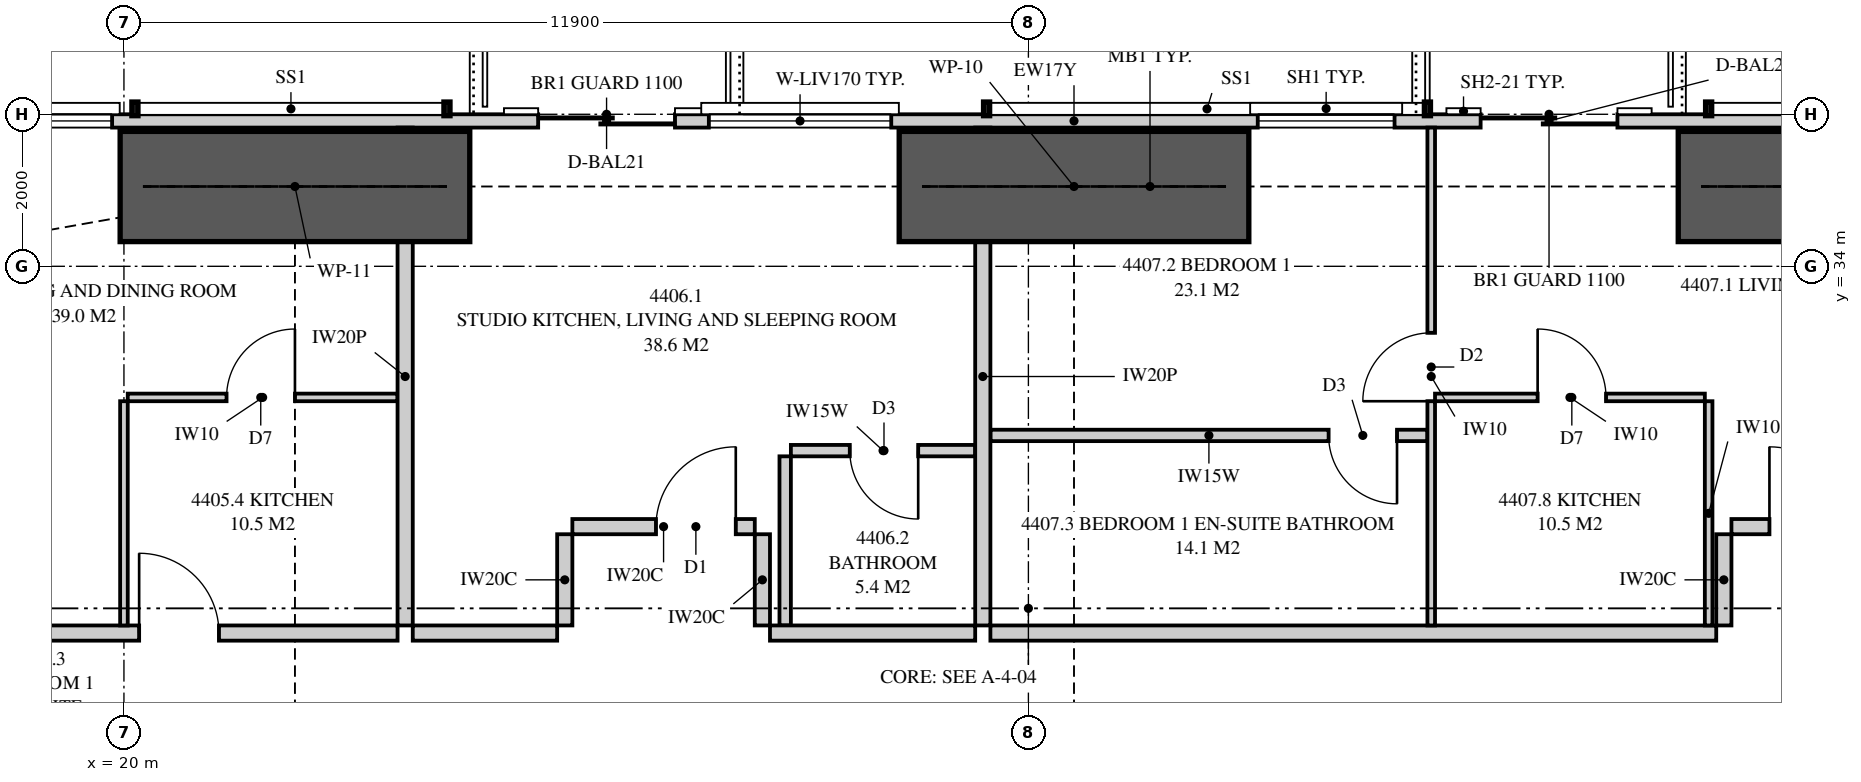
"""IFC4 building model, lengths in metres.
Left out: names, types, materials, properties, quantities, classifications, styles, units other than length and angle.
Written with IfcOpenShell. Run it as: python <this file> out.ifc"""

import sys

from ifc_helpers import new_model, si_unit, direction, frame, frame_2d, origin, place, context, subcontext, project, spatial, polyline, rectangle, outline, extrude, element, fill, save


model = new_model("IFC4")
c1 = context("Model", 3, precision=1e-05, world=origin(), true_north=direction((0.0, 1.0)))
c2 = subcontext(c1, "Body", "Model", "MODEL_VIEW")
j1 = project(units=[si_unit("LENGTHUNIT", "METRE"), si_unit("PLANEANGLEUNIT", "RADIAN")], contexts=[c1])
p1 = place(None, origin())
s1 = spatial("IfcSite", under=j1, at=p1, CompositionType="ELEMENT")
p2 = place(p1, origin())
s2 = spatial("IfcBuilding", under=s1, at=p2, CompositionType="ELEMENT")
p3 = place(p2, frame((0.0, 0.0, 164.4)))
s3 = spatial("IfcBuildingStorey", under=s2, at=p3, CompositionType="ELEMENT", Elevation=164.4)
p4 = place(p3, frame((49.949, 35.913, 0.0), z_axis=(0.0, 0.0, 1.0), x_axis=(-1.0, 0.0, 0.0)))
e1 = element("IfcWall", 1, at=p4, inside=s3, PredefinedType="SOLIDWALL", context=c2, shape_type="SweptSolid", body=[
    extrude(outline(polyline([(0.0, 0.0), (34.897, 0.0), (34.897, 3.11), (27.91, 3.11), (27.91, 2.15), (27.836, 2.15), (27.836, 3.11), (27.699, 3.11), (27.699, 2.15), (7.199, 2.15), (7.199, 3.11), (7.062, 3.11), (7.062, 2.15), (6.987, 2.15), (6.987, 3.11), (0.0, 3.11), (0.0, 0.0)])), frame((0.0, 0.087, 0.0), z_axis=(0.0, -1.0, 0.0), x_axis=(1.0, 0.0, 0.0)), (0.0, 0.0, 1.0), 0.175),
])
p5 = place(p4, frame((2.149, 0.0, 0.4)))
e2 = element("IfcOpeningElement", 2, at=p5, cuts=e1, PredefinedType="OPENING", context=c2, shape_type="SweptSolid", body=[
    extrude(rectangle(XDim=1.8, YDim=1.7, at=frame_2d((0.9, 0.85))), frame((0.0, 0.097, 0.0), z_axis=(0.0, -1.0, 0.0), x_axis=(1.0, 0.0, 0.0)), (0.0, 0.0, 1.0), 0.195),
])
p6 = place(p4, frame((10.299, 0.0, 0.0)))
e3 = element("IfcOpeningElement", 3, at=p6, cuts=e1, PredefinedType="OPENING", context=c2, shape_type="SweptSolid", body=[
    extrude(rectangle(XDim=1.8, YDim=2.1, at=frame_2d((0.9, 1.05))), frame((0.0, 0.097, 0.0), z_axis=(0.0, -1.0, 0.0), x_axis=(1.0, 0.0, 0.0)), (0.0, 0.0, 1.0), 0.195),
])
p7 = place(p4, frame((13.231, 0.0, 0.4)))
e4 = element("IfcOpeningElement", 4, at=p7, cuts=e1, PredefinedType="OPENING", context=c2, shape_type="SweptSolid", body=[
    extrude(rectangle(XDim=1.8, YDim=1.7, at=frame_2d((0.9, 0.85))), frame((0.0, 0.097, 0.0), z_axis=(0.0, -1.0, 0.0), x_axis=(1.0, 0.0, 0.0)), (0.0, 0.0, 1.0), 0.195),
])
p8 = place(p4, frame((22.699, 0.0, 0.0)))
e5 = element("IfcOpeningElement", 5, at=p8, cuts=e1, PredefinedType="OPENING", context=c2, shape_type="SweptSolid", body=[
    extrude(rectangle(XDim=1.8, YDim=2.1, at=frame_2d((0.9, 1.05))), frame((0.0, 0.097, 0.0), z_axis=(0.0, -1.0, 0.0), x_axis=(1.0, 0.0, 0.0)), (0.0, 0.0, 1.0), 0.195),
])
p9 = place(p4, frame((19.853, 0.0, 0.4)))
e6 = element("IfcOpeningElement", 6, at=p9, cuts=e1, PredefinedType="OPENING", context=c2, shape_type="SweptSolid", body=[
    extrude(rectangle(XDim=2.4, YDim=1.7, at=frame_2d((1.2, 0.85))), frame((0.0, 0.097, 0.0), z_axis=(0.0, -1.0, 0.0), x_axis=(1.0, 0.0, 0.0)), (0.0, 0.0, 1.0), 0.195),
])
p10 = place(p4, frame((30.104, 0.0, 0.4)))
e7 = element("IfcOpeningElement", 7, at=p10, cuts=e1, PredefinedType="OPENING", context=c2, shape_type="SweptSolid", body=[
    extrude(rectangle(XDim=2.4, YDim=1.7, at=frame_2d((1.2, 0.85))), frame((0.0, 0.097, 0.0), z_axis=(0.0, -1.0, 0.0), x_axis=(1.0, 0.0, 0.0)), (0.0, 0.0, 1.0), 0.195),
])
p11 = place(p3, frame((23.7, 35.825, 0.0), z_axis=(0.0, 0.0, 1.0), x_axis=(0.0, -1.0, 0.0)))
e8 = element("IfcWall", 8, at=p11, inside=s3, PredefinedType="PARTITIONING", context=c2, shape_type="SweptSolid", body=[
    extrude(outline(polyline([(0.529, 2.15), (0.0, 2.15), (0.0, 0.0), (0.529, 0.0), (0.529, 0.332), (1.021, 0.332), (1.021, 0.0), (6.55, 0.0), (6.55, 3.11), (1.685, 3.11), (1.685, 2.15), (1.021, 2.15), (1.021, 1.818), (0.529, 1.818), (0.529, 2.15)])), frame((0.0, 0.1, 0.0), z_axis=(0.0, -1.0, 0.0), x_axis=(1.0, 0.0, 0.0)), (0.0, 0.0, 1.0), 0.2),
])
p12 = place(p3, frame((17.85, 29.175, 0.0), z_axis=(0.0, 0.0, 1.0), x_axis=(1.0, 0.0, 0.0)))
e9 = element("IfcWall", 9, at=p12, inside=s3, PredefinedType="PARTITIONING", context=c2, shape_type="SweptSolid", body=[
    extrude(outline(polyline([(0.0, 0.0), (5.75, 0.0), (5.75, 3.11), (4.737, 3.11), (4.737, 2.541), (4.062, 2.541), (4.062, 3.11), (0.0, 3.11), (0.0, 0.0)])), frame((0.0, 0.1, 0.0), z_axis=(0.0, -1.0, 0.0), x_axis=(1.0, 0.0, 0.0)), (0.0, 0.0, 1.0), 0.2),
])
p13 = place(p12, frame((2.35, 0.0, 0.0)))
e10 = element("IfcOpeningElement", 10, at=p13, cuts=e9, PredefinedType="OPENING", context=c2, shape_type="SweptSolid", body=[
    extrude(rectangle(XDim=1.05, YDim=2.2, at=frame_2d((0.525, 1.1))), frame((0.0, 0.11, 0.0), z_axis=(0.0, -1.0, 0.0), x_axis=(1.0, 0.0, 0.0)), (0.0, 0.0, 1.0), 0.22),
])
p14 = place(p3, frame((20.05, 32.275, 0.0), z_axis=(0.0, 0.0, 1.0), x_axis=(1.0, 0.0, 0.0)))
e11 = element("IfcWall", 11, at=p14, inside=s3, PredefinedType="PARTITIONING", context=c2, shape_type="SweptSolid", body=[
    extrude(outline(polyline([(0.0, 0.0), (3.55, 0.0), (3.55, 3.11), (2.487, 3.11), (2.487, 2.541), (1.913, 2.541), (1.913, 3.11), (0.0, 3.11), (0.0, 0.0)])), frame((0.0, 0.05, 0.0), z_axis=(0.0, -1.0, 0.0), x_axis=(1.0, 0.0, 0.0)), (0.0, 0.0, 1.0), 0.1),
])
p15 = place(p14, frame((1.3, 0.0, 0.0)))
e12 = element("IfcOpeningElement", 12, at=p15, cuts=e11, PredefinedType="OPENING", context=c2, shape_type="SweptSolid", body=[
    extrude(rectangle(XDim=0.9, YDim=2.1, at=frame_2d((0.45, 1.05))), frame((0.0, 0.06, 0.0), z_axis=(0.0, -1.0, 0.0), x_axis=(1.0, 0.0, 0.0)), (0.0, 0.0, 1.0), 0.12),
])
p16 = place(p3, frame((20.0, 32.225, 0.0), z_axis=(0.0, 0.0, 1.0), x_axis=(0.0, -1.0, 0.0)))
e13 = element("IfcWall", 13, at=p16, inside=s3, PredefinedType="PARTITIONING", context=c2, shape_type="SweptSolid", body=[
    extrude(rectangle(XDim=2.95, YDim=0.1, at=frame_2d((1.475, 0.0))), origin(), (0.0, 0.0, 1.0), 3.11),
])
p17 = place(p3, frame((31.3, 35.825, 0.0), z_axis=(0.0, 0.0, 1.0), x_axis=(0.0, -1.0, 0.0)))
e14 = element("IfcWall", 14, at=p17, inside=s3, PredefinedType="PARTITIONING", context=c2, shape_type="SweptSolid", body=[
    extrude(outline(polyline([(0.529, 2.15), (0.0, 2.15), (0.0, 0.0), (0.529, 0.0), (0.529, 0.542), (1.021, 0.542), (1.021, 0.0), (6.55, 0.0), (6.55, 3.11), (1.685, 3.11), (1.685, 2.15), (1.021, 2.15), (1.021, 1.609), (0.529, 1.609), (0.529, 2.15)])), frame((0.0, 0.1, 0.0), z_axis=(0.0, -1.0, 0.0), x_axis=(1.0, 0.0, 0.0)), (0.0, 0.0, 1.0), 0.2),
])
p18 = place(p3, frame((23.8, 29.175, 0.0), z_axis=(0.0, 0.0, 1.0), x_axis=(1.0, 0.0, 0.0)))
e15 = element("IfcWall", 15, at=p18, inside=s3, PredefinedType="PARTITIONING", context=c2, shape_type="SweptSolid", body=[
    extrude(rectangle(XDim=1.9, YDim=0.2, at=frame_2d((0.95, 0.0))), origin(), (0.0, 0.0, 1.0), 3.11),
])
p19 = place(p3, frame((28.775, 31.575, 0.0), z_axis=(0.0, 0.0, 1.0), x_axis=(1.0, 0.0, 0.0)))
e16 = element("IfcWall", 16, at=p19, inside=s3, PredefinedType="PLUMBINGWALL", context=c2, shape_type="SweptSolid", body=[
    extrude(rectangle(XDim=2.425, YDim=0.15, at=frame_2d((1.212, 0.0))), origin(), (0.0, 0.0, 1.0), 3.11),
])
p20 = place(p19, frame((0.775, 0.0, 0.0)))
e17 = element("IfcOpeningElement", 17, at=p20, cuts=e16, PredefinedType="OPENING", context=c2, shape_type="SweptSolid", body=[
    extrude(rectangle(XDim=0.9, YDim=2.1, at=frame_2d((0.45, 1.05))), frame((0.0, 0.085, 0.0), z_axis=(0.0, -1.0, 0.0), x_axis=(1.0, 0.0, 0.0)), (0.0, 0.0, 1.0), 0.17),
])
p21 = place(p3, frame((28.7, 31.5, 0.0), z_axis=(0.0, 0.0, 1.0), x_axis=(0.0, -1.0, 0.0)))
e18 = element("IfcWall", 18, at=p21, inside=s3, PredefinedType="PLUMBINGWALL", context=c2, shape_type="SweptSolid", body=[
    extrude(rectangle(XDim=2.225, YDim=0.15, at=frame_2d((1.113, 0.0))), origin(), (0.0, 0.0, 1.0), 3.11),
])
p22 = place(p3, frame((31.4, 29.175, 0.0), z_axis=(0.0, 0.0, 1.0), x_axis=(1.0, 0.0, 0.0)))
e19 = element("IfcWall", 19, at=p22, inside=s3, PredefinedType="PARTITIONING", context=c2, shape_type="SweptSolid", body=[
    extrude(outline(polyline([(0.0, 0.0), (9.55, 0.0), (9.55, 3.11), (1.437, 3.11), (1.437, 2.541), (0.763, 2.541), (0.763, 3.11), (0.0, 3.11), (0.0, 0.0)])), frame((0.0, 0.1, 0.0), z_axis=(0.0, -1.0, 0.0), x_axis=(1.0, 0.0, 0.0)), (0.0, 0.0, 1.0), 0.2),
])
p23 = place(p3, frame((37.2, 35.825, 0.0), z_axis=(0.0, 0.0, 1.0), x_axis=(0.0, -1.0, 0.0)))
e20 = element("IfcWall", 20, at=p23, inside=s3, PredefinedType="PARTITIONING", context=c2, shape_type="SweptSolid", body=[
    extrude(outline(polyline([(0.0, 0.0), (6.55, 0.0), (6.55, 3.11), (1.635, 3.11), (1.635, 2.15), (0.0, 2.15), (0.0, 3.11), (0.0, 0.0)])), frame((0.0, 0.05, 0.0), z_axis=(0.0, -1.0, 0.0), x_axis=(1.0, 0.0, 0.0)), (0.0, 0.0, 1.0), 0.1),
])
p24 = place(p23, frame((2.7, 0.0, 0.0)))
e21 = element("IfcOpeningElement", 21, at=p24, cuts=e20, PredefinedType="OPENING", context=c2, shape_type="SweptSolid", body=[
    extrude(rectangle(XDim=0.9, YDim=2.1, at=frame_2d((0.45, 1.05))), frame((0.0, 0.06, 0.0), z_axis=(0.0, -1.0, 0.0), x_axis=(1.0, 0.0, 0.0)), (0.0, 0.0, 1.0), 0.12),
])
p25 = place(p3, frame((31.4, 31.775, 0.0), z_axis=(0.0, 0.0, 1.0), x_axis=(1.0, 0.0, 0.0)))
e22 = element("IfcWall", 22, at=p25, inside=s3, PredefinedType="PLUMBINGWALL", context=c2, shape_type="SweptSolid", body=[
    extrude(outline(polyline([(0.0, 0.0), (5.75, 0.0), (5.75, 3.11), (1.412, 3.11), (1.412, 2.541), (0.788, 2.541), (0.788, 3.11), (0.0, 3.11), (0.0, 0.0)])), frame((0.0, 0.075, 0.0), z_axis=(0.0, -1.0, 0.0), x_axis=(1.0, 0.0, 0.0)), (0.0, 0.0, 1.0), 0.15),
])
p26 = place(p25, frame((4.45, 0.0, 0.0)))
e23 = element("IfcOpeningElement", 23, at=p26, cuts=e22, PredefinedType="OPENING", context=c2, shape_type="SweptSolid", body=[
    extrude(rectangle(XDim=0.9, YDim=2.1, at=frame_2d((0.45, 1.05))), frame((0.0, 0.085, 0.0), z_axis=(0.0, -1.0, 0.0), x_axis=(1.0, 0.0, 0.0)), (0.0, 0.0, 1.0), 0.17),
])
p27 = place(p3, frame((37.25, 32.275, 0.0), z_axis=(0.0, 0.0, 1.0), x_axis=(1.0, 0.0, 0.0)))
e24 = element("IfcWall", 24, at=p27, inside=s3, PredefinedType="PARTITIONING", context=c2, shape_type="SweptSolid", body=[
    extrude(rectangle(XDim=3.55, YDim=0.1, at=frame_2d((1.775, 0.0))), origin(), (0.0, 0.0, 1.0), 3.11),
])
p28 = place(p27, frame((1.35, 0.0, 0.0)))
e25 = element("IfcOpeningElement", 25, at=p28, cuts=e24, PredefinedType="OPENING", context=c2, shape_type="SweptSolid", body=[
    extrude(rectangle(XDim=0.9, YDim=2.1, at=frame_2d((0.45, 1.05))), frame((0.0, 0.06, 0.0), z_axis=(0.0, -1.0, 0.0), x_axis=(1.0, 0.0, 0.0)), (0.0, 0.0, 1.0), 0.12),
])
p29 = place(p3, frame((40.85, 32.225, 0.0), z_axis=(0.0, 0.0, 1.0), x_axis=(0.0, -1.0, 0.0)))
e26 = element("IfcWall", 26, at=p29, inside=s3, PredefinedType="PARTITIONING", context=c2, shape_type="SweptSolid", body=[
    extrude(rectangle(XDim=2.95, YDim=0.1, at=frame_2d((1.475, 0.0))), origin(), (0.0, 0.0, 1.0), 3.11),
])
p30 = place(p3, frame((28.5, 29.175, 0.0), z_axis=(0.0, 0.0, 1.0), x_axis=(1.0, 0.0, 0.0)))
e27 = element("IfcWall", 27, at=p30, inside=s3, PredefinedType="PARTITIONING", context=c2, shape_type="SweptSolid", body=[
    extrude(rectangle(XDim=2.7, YDim=0.2, at=frame_2d((1.35, 0.0))), origin(), (0.0, 0.0, 1.0), 3.11),
])
p31 = place(p3, frame((25.9, 30.575, 0.0), z_axis=(0.0, 0.0, 1.0), x_axis=(1.0, 0.0, 0.0)))
e28 = element("IfcWall", 28, at=p31, inside=s3, PredefinedType="PARTITIONING", context=c2, shape_type="SweptSolid", body=[
    extrude(rectangle(XDim=2.4, YDim=0.2, at=frame_2d((1.2, 0.0))), origin(), (0.0, 0.0, 1.0), 3.11),
])
p32 = place(p31, frame((1.1, 0.0, 0.0)))
e29 = element("IfcOpeningElement", 29, at=p32, cuts=e28, PredefinedType="OPENING", context=c2, shape_type="SweptSolid", body=[
    extrude(rectangle(XDim=1.05, YDim=2.2, at=frame_2d((0.525, 1.1))), frame((0.0, 0.11, 0.0), z_axis=(0.0, -1.0, 0.0), x_axis=(1.0, 0.0, 0.0)), (0.0, 0.0, 1.0), 0.22),
])
for number, where, z_axis, x_axis in (
    (30, (25.8, 29.275, 0.0), (0.0, 0.0, 1.0), (0.0, 1.0, 0.0)),
    (31, (28.4, 29.275, 0.0), (0.0, 0.0, 1.0), (0.0, 1.0, 0.0)),
):
    element("IfcWall", number, at=place(p3, frame(where, z_axis=z_axis, x_axis=x_axis)), inside=s3, PredefinedType="PARTITIONING", context=c2, shape_type="SweptSolid", body=[
        extrude(rectangle(XDim=1.2, YDim=0.2, at=frame_2d((0.6, 0.0))), origin(), (0.0, 0.0, 1.0), 3.11),
    ])
p33 = place(p3, frame((41.15, 30.575, 0.0), z_axis=(0.0, 0.0, 1.0), x_axis=(1.0, 0.0, 0.0)))
e32 = element("IfcWall", 32, at=p33, inside=s3, PredefinedType="PARTITIONING", context=c2, shape_type="SweptSolid", body=[
    extrude(outline(polyline([(0.0, 0.0), (2.4, 0.0), (2.4, 3.11), (1.938, 3.11), (1.938, 2.541), (1.263, 2.541), (1.263, 3.11), (0.0, 3.11), (0.0, 0.0)])), frame((0.0, 0.1, 0.0), z_axis=(0.0, -1.0, 0.0), x_axis=(1.0, 0.0, 0.0)), (0.0, 0.0, 1.0), 0.2),
])
p34 = place(p33, frame((0.5, 0.0, 0.0)))
e33 = element("IfcOpeningElement", 33, at=p34, cuts=e32, PredefinedType="OPENING", context=c2, shape_type="SweptSolid", body=[
    extrude(rectangle(XDim=1.05, YDim=2.2, at=frame_2d((0.525, 1.1))), frame((0.0, 0.11, 0.0), z_axis=(0.0, -1.0, 0.0), x_axis=(1.0, 0.0, 0.0)), (0.0, 0.0, 1.0), 0.22),
])
p35 = place(p3, frame((41.05, 29.275, 0.0), z_axis=(0.0, 0.0, 1.0), x_axis=(0.0, 1.0, 0.0)))
e34 = element("IfcWall", 34, at=p35, inside=s3, PredefinedType="PARTITIONING", context=c2, shape_type="SweptSolid", body=[
    extrude(rectangle(XDim=1.2, YDim=0.2, at=frame_2d((0.6, 0.0))), origin(), (0.0, 0.0, 1.0), 3.11),
])
for number, where, z_axis, x_axis in (
    (35, (40.45, 35.05, 0.0), (0.0, 0.0, 1.0), (1.0, 0.0, 0.0)),
    (36, (30.2, 35.05, 0.0), (0.0, 0.0, 1.0), (1.0, 0.0, 0.0)),
    (37, (19.95, 35.05, 0.0), (0.0, 0.0, 1.0), (1.0, 0.0, 0.0)),
):
    element("IfcWall", number, at=place(p3, frame(where, z_axis=z_axis, x_axis=x_axis)), inside=s3, PredefinedType="SHEAR", context=c2, shape_type="SweptSolid", body=[
        extrude(rectangle(XDim=4.6, YDim=1.45, at=frame_2d((2.3, 0.0))), origin(), (0.0, 0.0, 1.0), 3.35),
    ])
p36 = place(p6, origin())
e38 = element("IfcDoor", 38, at=p36, inside=s3, OperationType="SLIDING_TO_LEFT", PredefinedType="DOOR", context=c2, shape_type="SweptSolid", body=[
    extrude(rectangle(XDim=1.8, YDim=2.1, at=frame_2d((0.9, 1.05))), frame((0.0, 0.025, 0.0), z_axis=(0.0, -1.0, 0.0), x_axis=(1.0, 0.0, 0.0)), (0.0, 0.0, 1.0), 0.05),
])
fill(e3, e38)
p37 = place(p7, origin())
e39 = element("IfcWindow", 39, at=p37, inside=s3, PartitioningType="SINGLE_PANEL", PredefinedType="WINDOW", context=c2, shape_type="SweptSolid", body=[
    extrude(rectangle(XDim=1.8, YDim=1.7, at=frame_2d((0.9, 0.85))), frame((0.0, 0.03, 0.0), z_axis=(0.0, -1.0, 0.0), x_axis=(1.0, 0.0, 0.0)), (0.0, 0.0, 1.0), 0.06),
])
fill(e4, e39)
p38 = place(p8, origin())
e40 = element("IfcDoor", 40, at=p38, inside=s3, OperationType="SLIDING_TO_LEFT", PredefinedType="DOOR", context=c2, shape_type="SweptSolid", body=[
    extrude(rectangle(XDim=1.8, YDim=2.1, at=frame_2d((0.9, 1.05))), frame((0.0, 0.025, 0.0), z_axis=(0.0, -1.0, 0.0), x_axis=(1.0, 0.0, 0.0)), (0.0, 0.0, 1.0), 0.05),
])
fill(e5, e40)
p39 = place(p9, origin())
e41 = element("IfcWindow", 41, at=p39, inside=s3, PartitioningType="SINGLE_PANEL", PredefinedType="WINDOW", context=c2, shape_type="SweptSolid", body=[
    extrude(rectangle(XDim=2.4, YDim=1.7, at=frame_2d((1.2, 0.85))), frame((0.0, 0.03, 0.0), z_axis=(0.0, -1.0, 0.0), x_axis=(1.0, 0.0, 0.0)), (0.0, 0.0, 1.0), 0.06),
])
fill(e6, e41)
p40 = place(p10, origin())
e42 = element("IfcWindow", 42, at=p40, inside=s3, PartitioningType="SINGLE_PANEL", PredefinedType="WINDOW", context=c2, shape_type="SweptSolid", body=[
    extrude(rectangle(XDim=2.4, YDim=1.7, at=frame_2d((1.2, 0.85))), frame((0.0, 0.03, 0.0), z_axis=(0.0, -1.0, 0.0), x_axis=(1.0, 0.0, 0.0)), (0.0, 0.0, 1.0), 0.06),
])
fill(e7, e42)
p41 = place(p13, origin())
e43 = element("IfcDoor", 43, at=p41, inside=s3, OperationType="SINGLE_SWING_LEFT", PredefinedType="DOOR", context=c2, shape_type="SweptSolid", body=[
    extrude(rectangle(XDim=1.05, YDim=2.2, at=frame_2d((0.525, 1.1))), frame((0.0, 0.025, 0.0), z_axis=(0.0, -1.0, 0.0), x_axis=(1.0, 0.0, 0.0)), (0.0, 0.0, 1.0), 0.05),
])
fill(e10, e43)
p42 = place(p15, origin())
e44 = element("IfcDoor", 44, at=p42, inside=s3, OperationType="SINGLE_SWING_RIGHT", PredefinedType="DOOR", context=c2, shape_type="SweptSolid", body=[
    extrude(rectangle(XDim=0.9, YDim=2.1, at=frame_2d((0.45, 1.05))), frame((0.0, 0.025, 0.0), z_axis=(0.0, -1.0, 0.0), x_axis=(1.0, 0.0, 0.0)), (0.0, 0.0, 1.0), 0.05),
])
fill(e12, e44)
p43 = place(p32, origin())
e45 = element("IfcDoor", 45, at=p43, inside=s3, OperationType="SINGLE_SWING_RIGHT", PredefinedType="DOOR", context=c2, shape_type="SweptSolid", body=[
    extrude(rectangle(XDim=1.05, YDim=2.2, at=frame_2d((0.525, 1.1))), frame((0.0, 0.025, 0.0), z_axis=(0.0, -1.0, 0.0), x_axis=(1.0, 0.0, 0.0)), (0.0, 0.0, 1.0), 0.05),
])
fill(e29, e45)
p44 = place(p20, frame((0.9, 0.0, 0.0), z_axis=(0.0, 0.0, 1.0), x_axis=(-1.0, 0.0, 0.0)))
e46 = element("IfcDoor", 46, at=p44, inside=s3, OperationType="SINGLE_SWING_LEFT", PredefinedType="DOOR", context=c2, shape_type="SweptSolid", body=[
    extrude(rectangle(XDim=0.9, YDim=2.1, at=frame_2d((0.45, 1.05))), frame((0.0, 0.025, 0.0), z_axis=(0.0, -1.0, 0.0), x_axis=(1.0, 0.0, 0.0)), (0.0, 0.0, 1.0), 0.05),
])
fill(e17, e46)
p45 = place(p34, origin())
e47 = element("IfcDoor", 47, at=p45, inside=s3, OperationType="SINGLE_SWING_LEFT", PredefinedType="DOOR", context=c2, shape_type="SweptSolid", body=[
    extrude(rectangle(XDim=1.05, YDim=2.2, at=frame_2d((0.525, 1.1))), frame((0.0, 0.025, 0.0), z_axis=(0.0, -1.0, 0.0), x_axis=(1.0, 0.0, 0.0)), (0.0, 0.0, 1.0), 0.05),
])
fill(e33, e47)
p46 = place(p24, frame((0.9, 0.0, 0.0), z_axis=(0.0, 0.0, 1.0), x_axis=(-1.0, 0.0, 0.0)))
e48 = element("IfcDoor", 48, at=p46, inside=s3, OperationType="SINGLE_SWING_LEFT", PredefinedType="DOOR", context=c2, shape_type="SweptSolid", body=[
    extrude(rectangle(XDim=0.9, YDim=2.1, at=frame_2d((0.45, 1.05))), frame((0.0, 0.025, 0.0), z_axis=(0.0, -1.0, 0.0), x_axis=(1.0, 0.0, 0.0)), (0.0, 0.0, 1.0), 0.05),
])
fill(e21, e48)
p47 = place(p26, frame((0.9, 0.0, 0.0), z_axis=(0.0, 0.0, 1.0), x_axis=(-1.0, 0.0, 0.0)))
e49 = element("IfcDoor", 49, at=p47, inside=s3, OperationType="SINGLE_SWING_LEFT", PredefinedType="DOOR", context=c2, shape_type="SweptSolid", body=[
    extrude(rectangle(XDim=0.9, YDim=2.1, at=frame_2d((0.45, 1.05))), frame((0.0, 0.025, 0.0), z_axis=(0.0, -1.0, 0.0), x_axis=(1.0, 0.0, 0.0)), (0.0, 0.0, 1.0), 0.05),
])
fill(e23, e49)
p48 = place(p28, origin())
e50 = element("IfcDoor", 50, at=p48, inside=s3, OperationType="SINGLE_SWING_LEFT", PredefinedType="DOOR", context=c2, shape_type="SweptSolid", body=[
    extrude(rectangle(XDim=0.9, YDim=2.1, at=frame_2d((0.45, 1.05))), frame((0.0, 0.025, 0.0), z_axis=(0.0, -1.0, 0.0), x_axis=(1.0, 0.0, 0.0)), (0.0, 0.0, 1.0), 0.05),
])
fill(e25, e50)
save(model, sys.argv[1])
